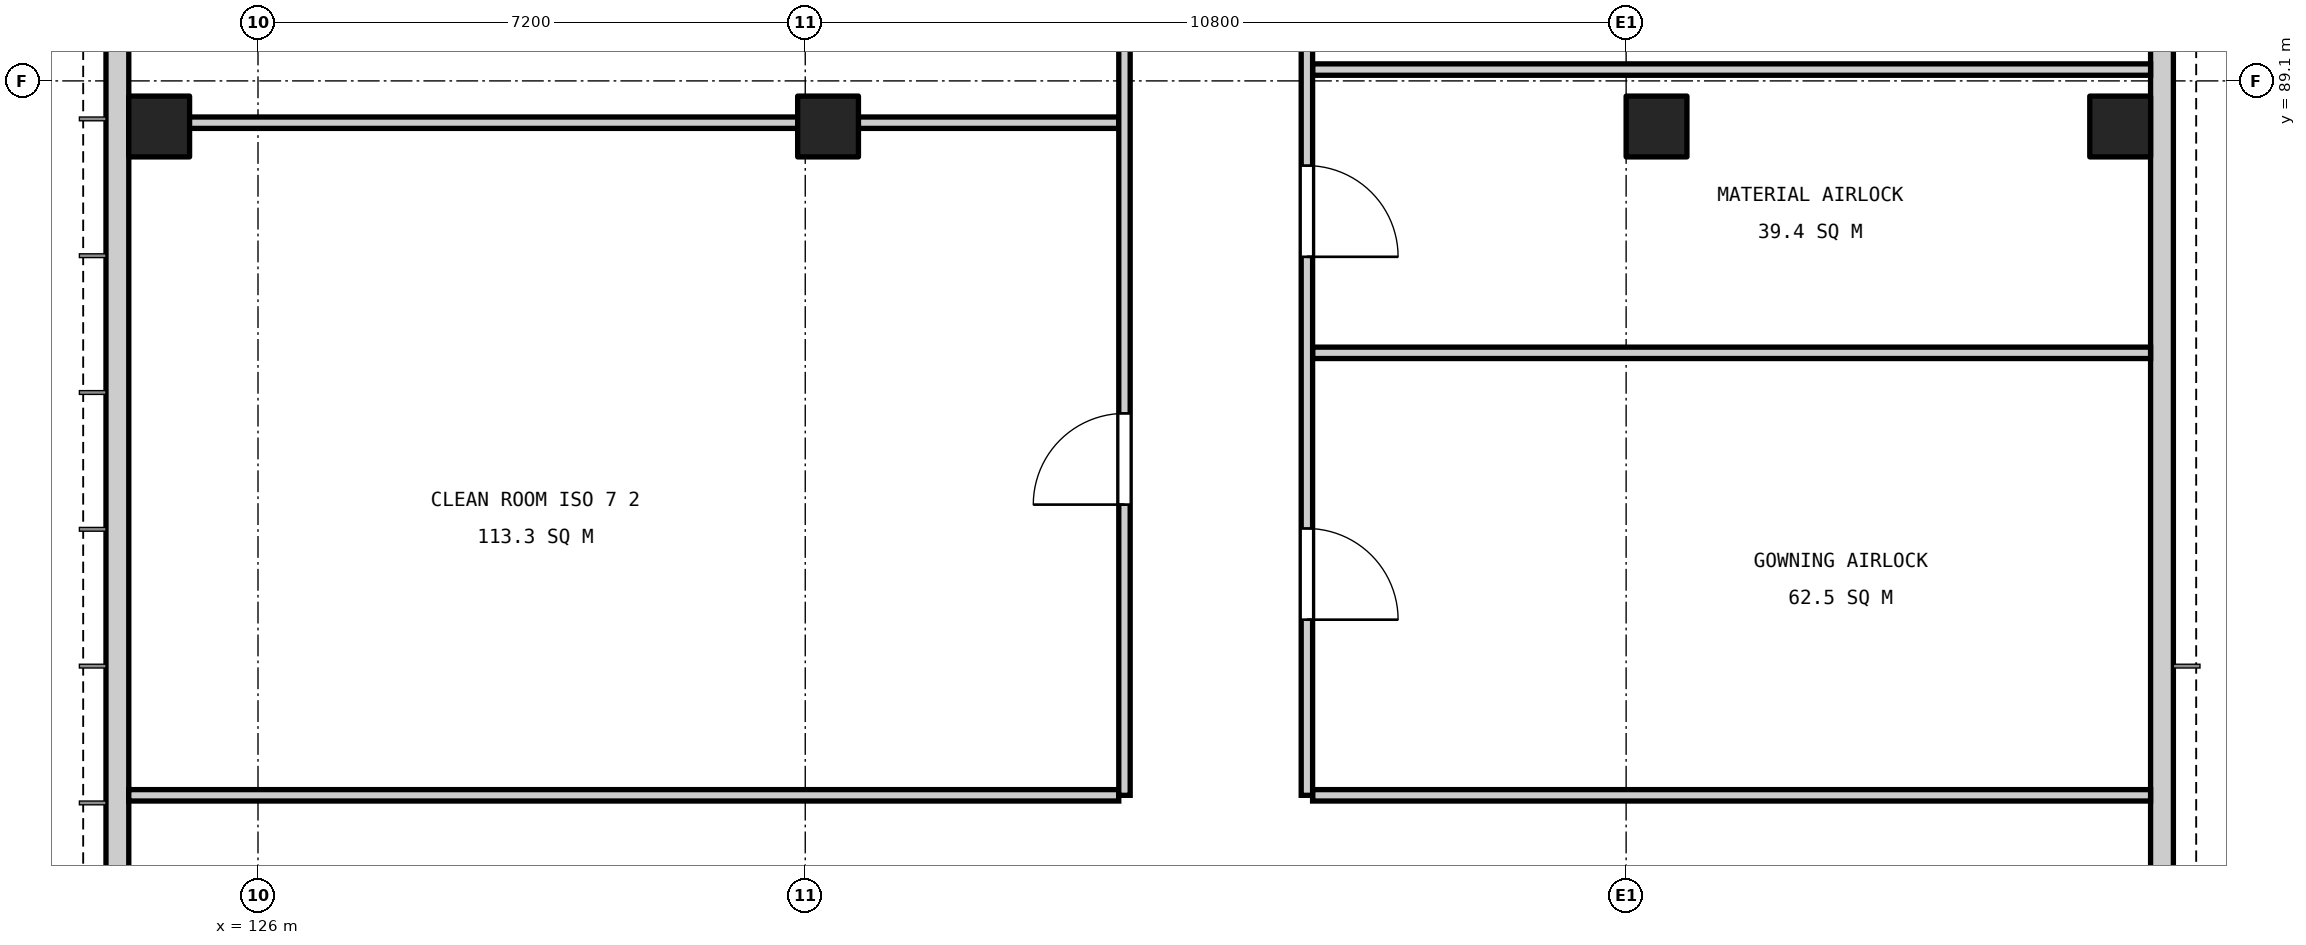
"""IFC4 building model, lengths in metres.
Left out: names, types, materials, properties, quantities, classifications, styles, units other than length and angle.
Written with IfcOpenShell. Run it as: python <this file> out.ifc"""

import sys

from ifc_helpers import new_model, si_unit, direction, frame, frame_2d, origin, origin_2d, place, context, subcontext, project, spatial, rectangle, extrude, element, fill, save


model = new_model("IFC4")
c1 = context("Model", 3, precision=1e-05, world=origin(), true_north=direction((0.0, 1.0)))
c2 = subcontext(c1, "Body", "Model", "MODEL_VIEW")
j1 = project(units=[si_unit("LENGTHUNIT", "METRE"), si_unit("PLANEANGLEUNIT", "RADIAN")], contexts=[c1])
p1 = place(None, origin())
s1 = spatial("IfcSite", under=j1, at=p1, CompositionType="ELEMENT")
p2 = place(p1, origin())
s2 = spatial("IfcBuilding", under=s1, at=p2, CompositionType="ELEMENT")
p3 = place(p2, frame((0.0, 0.0, 11.4)))
s3 = spatial("IfcBuildingStorey", under=s2, at=p3, CompositionType="ELEMENT", Elevation=11.4)
for number, where, z_axis, x_axis in (
    (1, (124.7, 88.5, 0.0), (0.0, 0.0, 1.0), (1.0, 0.0, 0.0)),
    (2, (133.5, 88.5, 0.0), (0.0, 0.0, 1.0), (1.0, 0.0, 0.0)),
    (3, (144.4, 88.5, 0.0), (0.0, 0.0, 1.0), (1.0, 0.0, 0.0)),
    (4, (150.5, 88.5, 0.0), (0.0, 0.0, 1.0), (1.0, 0.0, 0.0)),
):
    element("IfcColumn", number, at=place(p3, frame(where, z_axis=z_axis, x_axis=x_axis)), inside=s3, PredefinedType="COLUMN", context=c2, shape_type="SweptSolid", body=[
        extrude(rectangle(XDim=0.8, YDim=0.8, at=origin_2d()), origin(), (0.0, 0.0, 1.0), 5.4),
    ])
for number, where, z_axis, x_axis in (
    (5, (124.15, 70.3, 0.0), (0.0, 0.0, 1.0), (0.0, 1.0, 0.0)),
    (6, (151.05, 70.3, 0.0), (0.0, 0.0, 1.0), (0.0, 1.0, 0.0)),
):
    element("IfcWall", number, at=place(p3, frame(where, z_axis=z_axis, x_axis=x_axis)), inside=s3, PredefinedType="SOLIDWALL", context=c2, shape_type="SweptSolid", body=[
        extrude(rectangle(XDim=36.5, YDim=0.3, at=frame_2d((18.25, 0.0))), origin(), (0.0, 0.0, 1.0), 4.95),
    ])
p4 = place(p3, frame((124.3, 79.7, 0.0), z_axis=(0.0, 0.0, 1.0), x_axis=(1.0, 0.0, 0.0)))
e7 = element("IfcWall", 7, at=p4, inside=s3, PredefinedType="SOLIDWALL", context=c2, shape_type="SweptSolid", body=[
    extrude(rectangle(XDim=13.025, YDim=0.15, at=frame_2d((6.512, 0.0))), origin(), (0.0, 0.0, 1.0), 4.95),
])
for number, where, z_axis, x_axis in (
    (8, (139.875, 79.7, 0.0), (0.0, 0.0, 1.0), (1.0, 0.0, 0.0)),
    (9, (139.875, 85.522, 0.0), (0.0, 0.0, 1.0), (1.0, 0.0, 0.0)),
):
    element("IfcWall", number, at=place(p3, frame(where, z_axis=z_axis, x_axis=x_axis)), inside=s3, PredefinedType="SOLIDWALL", context=c2, shape_type="SweptSolid", body=[
        extrude(rectangle(XDim=11.025, YDim=0.15, at=frame_2d((5.512, 0.0))), origin(), (0.0, 0.0, 1.0), 4.95),
    ])
p5 = place(p3, frame((124.3, 88.55, 0.0), z_axis=(0.0, 0.0, 1.0), x_axis=(1.0, 0.0, 0.0)))
e10 = element("IfcWall", 10, at=p5, inside=s3, PredefinedType="SOLIDWALL", context=c2, shape_type="SweptSolid", body=[
    extrude(rectangle(XDim=13.025, YDim=0.15, at=frame_2d((6.512, 0.0))), origin(), (0.0, 0.0, 1.0), 4.95),
])
p6 = place(p3, frame((139.875, 89.249, 0.0), z_axis=(0.0, 0.0, 1.0), x_axis=(1.0, 0.0, 0.0)))
e11 = element("IfcWall", 11, at=p6, inside=s3, PredefinedType="SOLIDWALL", context=c2, shape_type="SweptSolid", body=[
    extrude(rectangle(XDim=11.025, YDim=0.15, at=frame_2d((5.512, 0.0))), origin(), (0.0, 0.0, 1.0), 4.95),
])
p7 = place(p3, frame((137.4, 79.7, 0.0), z_axis=(0.0, 0.0, 1.0), x_axis=(0.0, 1.0, 0.0)))
e12 = element("IfcWall", 12, at=p7, inside=s3, PredefinedType="SOLIDWALL", context=c2, shape_type="SweptSolid", body=[
    extrude(rectangle(XDim=17.7, YDim=0.15, at=frame_2d((8.85, 0.0))), origin(), (0.0, 0.0, 1.0), 4.95),
])
p8 = place(p7, frame((3.825, 0.0, 0.0)))
e13 = element("IfcOpeningElement", 13, at=p8, cuts=e12, PredefinedType="OPENING", context=c2, shape_type="SweptSolid", body=[
    extrude(rectangle(XDim=1.2, YDim=2.1, at=frame_2d((0.6, 1.05))), frame((0.0, 0.085, 0.0), z_axis=(0.0, -1.0, 0.0), x_axis=(1.0, 0.0, 0.0)), (0.0, 0.0, 1.0), 0.17),
])
p9 = place(p7, frame((12.675, 0.0, 0.0)))
e14 = element("IfcOpeningElement", 14, at=p9, cuts=e12, PredefinedType="OPENING", context=c2, shape_type="SweptSolid", body=[
    extrude(rectangle(XDim=1.2, YDim=2.1, at=frame_2d((0.6, 1.05))), frame((0.0, 0.085, 0.0), z_axis=(0.0, -1.0, 0.0), x_axis=(1.0, 0.0, 0.0)), (0.0, 0.0, 1.0), 0.17),
])
p10 = place(p3, frame((139.8, 79.7, 0.0), z_axis=(0.0, 0.0, 1.0), x_axis=(0.0, 1.0, 0.0)))
e15 = element("IfcWall", 15, at=p10, inside=s3, PredefinedType="SOLIDWALL", context=c2, shape_type="SweptSolid", body=[
    extrude(rectangle(XDim=17.7, YDim=0.15, at=frame_2d((8.85, 0.0))), origin(), (0.0, 0.0, 1.0), 4.95),
])
p11 = place(p10, frame((2.311, 0.0, 0.0)))
e16 = element("IfcOpeningElement", 16, at=p11, cuts=e15, PredefinedType="OPENING", context=c2, shape_type="SweptSolid", body=[
    extrude(rectangle(XDim=1.2, YDim=2.1, at=frame_2d((0.6, 1.05))), frame((0.0, 0.085, 0.0), z_axis=(0.0, -1.0, 0.0), x_axis=(1.0, 0.0, 0.0)), (0.0, 0.0, 1.0), 0.17),
])
p12 = place(p10, frame((7.085, 0.0, 0.0)))
e17 = element("IfcOpeningElement", 17, at=p12, cuts=e15, PredefinedType="OPENING", context=c2, shape_type="SweptSolid", body=[
    extrude(rectangle(XDim=1.2, YDim=2.1, at=frame_2d((0.6, 1.05))), frame((0.0, 0.085, 0.0), z_axis=(0.0, -1.0, 0.0), x_axis=(1.0, 0.0, 0.0)), (0.0, 0.0, 1.0), 0.17),
])
p13 = place(p10, frame((11.428, 0.0, 0.0)))
e18 = element("IfcOpeningElement", 18, at=p13, cuts=e15, PredefinedType="OPENING", context=c2, shape_type="SweptSolid", body=[
    extrude(rectangle(XDim=0.9, YDim=2.1, at=frame_2d((0.45, 1.05))), frame((0.0, 0.085, 0.0), z_axis=(0.0, -1.0, 0.0), x_axis=(1.0, 0.0, 0.0)), (0.0, 0.0, 1.0), 0.17),
])
p14 = place(p10, frame((15.503, 0.0, 0.0)))
e19 = element("IfcOpeningElement", 19, at=p14, cuts=e15, PredefinedType="OPENING", context=c2, shape_type="SweptSolid", body=[
    extrude(rectangle(XDim=0.9, YDim=2.1, at=frame_2d((0.45, 1.05))), frame((0.0, 0.085, 0.0), z_axis=(0.0, -1.0, 0.0), x_axis=(1.0, 0.0, 0.0)), (0.0, 0.0, 1.0), 0.17),
])
p15 = place(p8, origin())
e20 = element("IfcDoor", 20, at=p15, inside=s3, OperationType="SINGLE_SWING_LEFT", PredefinedType="DOOR", context=c2, shape_type="SweptSolid", body=[
    extrude(rectangle(XDim=1.2, YDim=2.1, at=frame_2d((0.6, 1.05))), frame((0.0, 0.025, 0.0), z_axis=(0.0, -1.0, 0.0), x_axis=(1.0, 0.0, 0.0)), (0.0, 0.0, 1.0), 0.05),
])
fill(e13, e20)
p16 = place(p11, frame((1.2, 0.0, 0.0), z_axis=(0.0, 0.0, 1.0), x_axis=(-1.0, 0.0, 0.0)))
e21 = element("IfcDoor", 21, at=p16, inside=s3, OperationType="SINGLE_SWING_RIGHT", PredefinedType="DOOR", context=c2, shape_type="SweptSolid", body=[
    extrude(rectangle(XDim=1.2, YDim=2.1, at=frame_2d((0.6, 1.05))), frame((0.0, 0.025, 0.0), z_axis=(0.0, -1.0, 0.0), x_axis=(1.0, 0.0, 0.0)), (0.0, 0.0, 1.0), 0.05),
])
fill(e16, e21)
p17 = place(p12, frame((1.2, 0.0, 0.0), z_axis=(0.0, 0.0, 1.0), x_axis=(-1.0, 0.0, 0.0)))
e22 = element("IfcDoor", 22, at=p17, inside=s3, OperationType="SINGLE_SWING_RIGHT", PredefinedType="DOOR", context=c2, shape_type="SweptSolid", body=[
    extrude(rectangle(XDim=1.2, YDim=2.1, at=frame_2d((0.6, 1.05))), frame((0.0, 0.025, 0.0), z_axis=(0.0, -1.0, 0.0), x_axis=(1.0, 0.0, 0.0)), (0.0, 0.0, 1.0), 0.05),
])
fill(e17, e22)
save(model, sys.argv[1])
